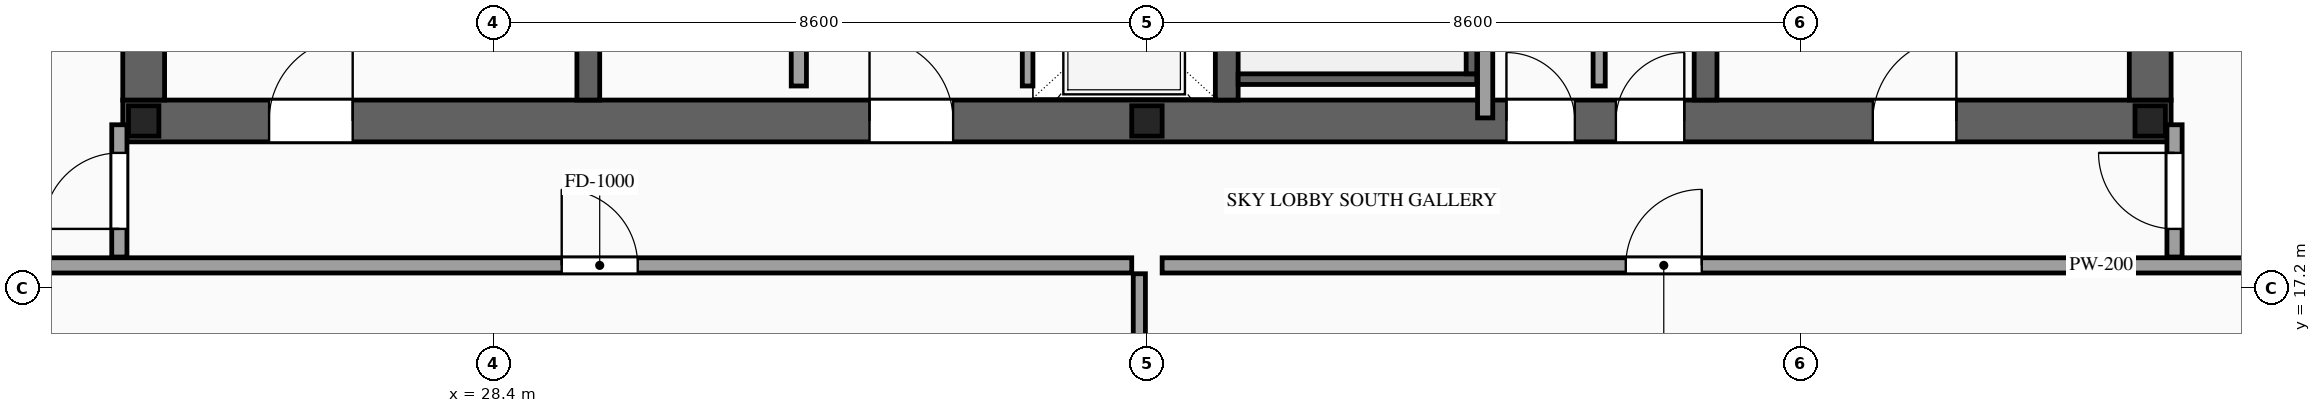
"""IFC4 building model, lengths in metres.
Left out: names, types, materials, properties, quantities, classifications, styles, units other than length and angle.
Written with IfcOpenShell. Run it as: python <this file> out.ifc"""

import sys

from ifc_helpers import new_model, si_unit, direction, frame, frame_2d, origin, origin_2d, place, context, subcontext, project, spatial, rectangle, i_section, extrude, source, transform, mapped, element, fill, save


model = new_model("IFC4")
c1 = context("Model", 3, precision=1e-05, world=origin(), true_north=direction((0.0, 1.0)))
c2 = subcontext(c1, "Body", "Model", "MODEL_VIEW")
j1 = project(units=[si_unit("LENGTHUNIT", "METRE"), si_unit("PLANEANGLEUNIT", "RADIAN")], contexts=[c1])
p1 = place(None, origin())
s1 = spatial("IfcSite", under=j1, at=p1, CompositionType="ELEMENT")
p2 = place(p1, origin())
s2 = spatial("IfcBuilding", under=s1, at=p2, CompositionType="ELEMENT")
p3 = place(p2, frame((0.0, 0.0, 259.1)))
s3 = spatial("IfcBuildingStorey", under=s2, at=p3, CompositionType="ELEMENT", Elevation=259.1)
p4 = place(p3, frame((23.525, 19.4, 0.0), z_axis=(0.0, 0.0, 1.0), x_axis=(1.0, 0.0, 0.0)))
e1 = element("IfcWall", 1, at=p4, inside=s3, PredefinedType="SHEAR", context=c2, shape_type="SweptSolid", body=[
    extrude(rectangle(XDim=26.95, YDim=0.55, at=frame_2d((13.475, 0.0))), origin(), (0.0, 0.0, 1.0), 4.4),
])
p5 = place(p4, frame((1.925, 0.0, 0.0)))
e2 = element("IfcOpeningElement", 2, at=p5, cuts=e1, PredefinedType="OPENING", context=c2, shape_type="SweptSolid", body=[
    extrude(rectangle(XDim=1.1, YDim=2.2, at=frame_2d((0.55, 1.1))), frame((0.0, 0.29, 0.0), z_axis=(0.0, -1.0, 0.0), x_axis=(1.0, 0.0, 0.0)), (0.0, 0.0, 1.0), 0.58),
])
p6 = place(p4, frame((9.825, 0.0, 0.0)))
e3 = element("IfcOpeningElement", 3, at=p6, cuts=e1, PredefinedType="OPENING", context=c2, shape_type="SweptSolid", body=[
    extrude(rectangle(XDim=1.1, YDim=2.2, at=frame_2d((0.55, 1.1))), frame((0.0, 0.29, 0.0), z_axis=(0.0, -1.0, 0.0), x_axis=(1.0, 0.0, 0.0)), (0.0, 0.0, 1.0), 0.58),
])
p7 = place(p4, frame((23.025, 0.0, 0.0)))
e4 = element("IfcOpeningElement", 4, at=p7, cuts=e1, PredefinedType="OPENING", context=c2, shape_type="SweptSolid", body=[
    extrude(rectangle(XDim=1.1, YDim=2.2, at=frame_2d((0.55, 1.1))), frame((0.0, 0.29, 0.0), z_axis=(0.0, -1.0, 0.0), x_axis=(1.0, 0.0, 0.0)), (0.0, 0.0, 1.0), 0.58),
])
p8 = place(p4, frame((19.645, 0.0, 0.0)))
e5 = element("IfcOpeningElement", 5, at=p8, cuts=e1, PredefinedType="OPENING", context=c2, shape_type="SweptSolid", body=[
    extrude(rectangle(XDim=0.9, YDim=2.15, at=frame_2d((0.45, 1.075))), frame((0.0, 0.29, 0.0), z_axis=(0.0, -1.0, 0.0), x_axis=(1.0, 0.0, 0.0)), (0.0, 0.0, 1.0), 0.58),
])
p9 = place(p4, frame((18.205, 0.0, 0.0)))
e6 = element("IfcOpeningElement", 6, at=p9, cuts=e1, PredefinedType="OPENING", context=c2, shape_type="SweptSolid", body=[
    extrude(rectangle(XDim=0.9, YDim=2.15, at=frame_2d((0.45, 1.075))), frame((0.0, 0.29, 0.0), z_axis=(0.0, -1.0, 0.0), x_axis=(1.0, 0.0, 0.0)), (0.0, 0.0, 1.0), 0.58),
])
m1 = source(origin(), c2, "Body", "SweptSolid", [
    extrude(rectangle(XDim=12.25, YDim=0.55, at=frame_2d((6.125, 0.0))), origin(), (0.0, 0.0, 1.0), 4.4),
])
for number, where, z_axis, x_axis in (
    (7, (23.8, 19.675, 0.0), (0.0, 0.0, 1.0), (0.0, 1.0, 0.0)),
    (8, (50.2, 19.675, 0.0), (0.0, 0.0, 1.0), (0.0, 1.0, 0.0)),
):
    element("IfcWall", number, at=place(p3, frame(where, z_axis=z_axis, x_axis=x_axis)), inside=s3, PredefinedType="SHEAR", context=c2, shape_type="MappedRepresentation", body=[
        mapped(m1, transform((0.0, 0.0, 0.0), scale=1.0)),
    ])
m2 = source(origin(), c2, "Body", "SweptSolid", [
    extrude(rectangle(XDim=12.25, YDim=0.3, at=frame_2d((6.125, 0.0))), origin(), (0.0, 0.0, 1.0), 4.4),
])
for number, where, z_axis, x_axis in (
    (9, (29.65, 19.675, 0.0), (0.0, 0.0, 1.0), (0.0, 1.0, 0.0)),
    (10, (38.05, 19.675, 0.0), (0.0, 0.0, 1.0), (0.0, 1.0, 0.0)),
):
    element("IfcWall", number, at=place(p3, frame(where, z_axis=z_axis, x_axis=x_axis)), inside=s3, PredefinedType="SOLIDWALL", context=c2, shape_type="MappedRepresentation", body=[
        mapped(m2, transform((0.0, 0.0, 0.0), scale=1.0)),
    ])
p10 = place(p3, frame((44.35, 19.675, 0.0), z_axis=(0.0, 0.0, 1.0), x_axis=(0.0, 1.0, 0.0)))
e11 = element("IfcWall", 11, at=p10, inside=s3, PredefinedType="SOLIDWALL", context=c2, shape_type="SweptSolid", body=[
    extrude(rectangle(XDim=12.25, YDim=0.3, at=frame_2d((6.125, 0.0))), origin(), (0.0, 0.0, 1.0), 4.4),
])
p11 = place(p10, frame((6.525, 0.0, 0.0)))
e12 = element("IfcOpeningElement", 12, at=p11, cuts=e11, PredefinedType="OPENING", context=c2, shape_type="SweptSolid", body=[
    extrude(rectangle(XDim=1.1, YDim=2.2, at=frame_2d((0.55, 1.1))), frame((0.0, 0.165, 0.0), z_axis=(0.0, -1.0, 0.0), x_axis=(1.0, 0.0, 0.0)), (0.0, 0.0, 1.0), 0.33),
])
p12 = place(p10, frame((8.625, 0.0, 0.0)))
e13 = element("IfcOpeningElement", 13, at=p12, cuts=e11, PredefinedType="OPENING", context=c2, shape_type="SweptSolid", body=[
    extrude(rectangle(XDim=1.1, YDim=2.2, at=frame_2d((0.55, 1.1))), frame((0.0, 0.165, 0.0), z_axis=(0.0, -1.0, 0.0), x_axis=(1.0, 0.0, 0.0)), (0.0, 0.0, 1.0), 0.33),
])
p13 = place(p10, frame((10.725, 0.0, 0.0)))
e14 = element("IfcOpeningElement", 14, at=p13, cuts=e11, PredefinedType="OPENING", context=c2, shape_type="SweptSolid", body=[
    extrude(rectangle(XDim=1.1, YDim=2.2, at=frame_2d((0.55, 1.1))), frame((0.0, 0.165, 0.0), z_axis=(0.0, -1.0, 0.0), x_axis=(1.0, 0.0, 0.0)), (0.0, 0.0, 1.0), 0.33),
])
m3 = source(origin(), c2, "Body", "SweptSolid", [
    extrude(i_section(OverallWidth=0.4, OverallDepth=0.4, WebThickness=0.013, FlangeThickness=0.021, at=origin_2d()), origin(), (0.0, 0.0, 1.0), 4.4),
])
for number, where, z_axis, x_axis in (
    (15, (23.8, 19.4, 0.0), (0.0, 0.0, 1.0), (1.0, 0.0, 0.0)),
    (16, (37.0, 19.4, 0.0), (0.0, 0.0, 1.0), (1.0, 0.0, 0.0)),
    (17, (50.2, 19.4, 0.0), (0.0, 0.0, 1.0), (1.0, 0.0, 0.0)),
):
    element("IfcColumn", number, at=place(p3, frame(where, z_axis=z_axis, x_axis=x_axis)), inside=s3, PredefinedType="COLUMN", context=c2, shape_type="MappedRepresentation", body=[
        mapped(m3, transform((0.0, 0.0, 0.0), scale=1.0)),
    ])
p14 = place(p3, frame((35.43, 19.86, 0.0), z_axis=(0.0, 0.0, 1.0), x_axis=(0.0, 1.0, 0.0)))
e18 = element("IfcWall", 18, at=p14, inside=s3, PredefinedType="SOLIDWALL", context=c2, shape_type="SweptSolid", body=[
    extrude(rectangle(XDim=2.04, YDim=0.14, at=frame_2d((1.02, 0.0))), origin(), (0.0, 0.0, 1.0), 4.12),
])
p15 = place(p14, frame((0.47, 0.0, 0.0)))
e19 = element("IfcOpeningElement", 19, at=p15, cuts=e18, PredefinedType="OPENING", context=c2, shape_type="SweptSolid", body=[
    extrude(rectangle(XDim=1.1, YDim=2.2, at=frame_2d((0.55, 1.1))), frame((0.0, 0.085, 0.0), z_axis=(0.0, -1.0, 0.0), x_axis=(1.0, 0.0, 0.0)), (0.0, 0.0, 1.0), 0.17),
])
m4 = source(origin(), c2, "Body", "SweptSolid", [
    extrude(rectangle(XDim=3.14, YDim=0.14, at=frame_2d((1.57, 0.0))), origin(), (0.0, 0.0, 1.0), 4.12),
])
p16 = place(p3, frame((38.2, 19.95, 0.0), z_axis=(0.0, 0.0, 1.0), x_axis=(1.0, 0.0, 0.0)))
e20 = element("IfcWall", 20, at=p16, inside=s3, PredefinedType="SOLIDWALL", context=c2, shape_type="MappedRepresentation", body=[
    mapped(m4, transform((0.0, 0.0, 0.0), scale=1.0)),
])
m5 = source(origin(), c2, "Body", "SweptSolid", [
    extrude(rectangle(XDim=8.94, YDim=0.14, at=frame_2d((4.47, 0.0))), origin(), (0.0, 0.0, 1.0), 4.12),
])
p17 = place(p3, frame((41.27, 20.02, 0.0), z_axis=(0.0, 0.0, 1.0), x_axis=(0.0, 1.0, 0.0)))
e21 = element("IfcWall", 21, at=p17, inside=s3, PredefinedType="SOLIDWALL", context=c2, shape_type="MappedRepresentation", body=[
    mapped(m5, transform((0.0, 0.0, 0.0), scale=1.0)),
])
p18 = place(p3, frame((32.42, 19.86, 0.0), z_axis=(0.0, 0.0, 1.0), x_axis=(0.0, 1.0, 0.0)))
e22 = element("IfcWall", 22, at=p18, inside=s3, PredefinedType="PARTITIONING", context=c2, shape_type="SweptSolid", body=[
    extrude(rectangle(XDim=3.94, YDim=0.2, at=frame_2d((1.97, 0.0))), origin(), (0.0, 0.0, 1.0), 4.12),
])
p19 = place(p18, frame((1.52, 0.0, 0.0)))
e23 = element("IfcOpeningElement", 23, at=p19, cuts=e22, PredefinedType="OPENING", context=c2, shape_type="SweptSolid", body=[
    extrude(rectangle(XDim=0.9, YDim=2.15, at=frame_2d((0.45, 1.075))), frame((0.0, 0.115, 0.0), z_axis=(0.0, -1.0, 0.0), x_axis=(1.0, 0.0, 0.0)), (0.0, 0.0, 1.0), 0.23),
])
m6 = source(origin(), c2, "Body", "SweptSolid", [
    extrude(rectangle(XDim=1.34, YDim=0.16, at=frame_2d((0.67, 0.0))), origin(), (0.0, 0.0, 1.0), 4.12),
])
p20 = place(p3, frame((42.95, 19.86, 0.0), z_axis=(0.0, 0.0, 1.0), x_axis=(0.0, 1.0, 0.0)))
e24 = element("IfcWall", 24, at=p20, inside=s3, PredefinedType="PARTITIONING", context=c2, shape_type="MappedRepresentation", body=[
    mapped(m6, transform((0.0, 0.0, 0.0), scale=1.0)),
])
m7 = source(origin(), c2, "Body", "SweptSolid", [
    extrude(rectangle(XDim=6.06, YDim=0.2, at=frame_2d((3.03, 0.0))), origin(), (0.0, 0.0, 1.0), 4.12),
])
p21 = place(p3, frame((41.45, 19.44, 0.0), z_axis=(0.0, 0.0, 1.0), x_axis=(0.0, 1.0, 0.0)))
e25 = element("IfcWall", 25, at=p21, inside=s3, PredefinedType="PARTITIONING", context=c2, shape_type="MappedRepresentation", body=[
    mapped(m7, transform((0.0, 0.0, 0.0), scale=1.0)),
])
p22 = place(p3, frame((19.44, 17.5, 0.0), z_axis=(0.0, 0.0, 1.0), x_axis=(1.0, 0.0, 0.0)))
e26 = element("IfcWall", 26, at=p22, inside=s3, PredefinedType="PARTITIONING", context=c2, shape_type="SweptSolid", body=[
    extrude(rectangle(XDim=17.36, YDim=0.2, at=frame_2d((8.68, 0.0))), origin(), (0.0, 0.0, 1.0), 4.12),
])
p23 = place(p22, frame((9.86, 0.0, 0.0)))
e27 = element("IfcOpeningElement", 27, at=p23, cuts=e26, PredefinedType="OPENING", context=c2, shape_type="SweptSolid", body=[
    extrude(rectangle(XDim=1.0, YDim=2.2, at=frame_2d((0.5, 1.1))), frame((0.0, 0.115, 0.0), z_axis=(0.0, -1.0, 0.0), x_axis=(1.0, 0.0, 0.0)), (0.0, 0.0, 1.0), 0.23),
])
m8 = source(origin(), c2, "Body", "SweptSolid", [
    extrude(rectangle(XDim=12.04, YDim=0.16, at=frame_2d((6.02, 0.0))), origin(), (0.0, 0.0, 1.0), 3.627),
])
p24 = place(p3, frame((36.9, 5.35, 0.0), z_axis=(0.0, 0.0, 1.0), x_axis=(0.0, 1.0, 0.0)))
e28 = element("IfcWall", 28, at=p24, inside=s3, PredefinedType="PARTITIONING", context=c2, shape_type="MappedRepresentation", body=[
    mapped(m8, transform((0.0, 0.0, 0.0), scale=1.0)),
])
p25 = place(p3, frame((37.2, 17.5, 0.0), z_axis=(0.0, 0.0, 1.0), x_axis=(1.0, 0.0, 0.0)))
e29 = element("IfcWall", 29, at=p25, inside=s3, PredefinedType="PARTITIONING", context=c2, shape_type="SweptSolid", body=[
    extrude(rectangle(XDim=17.36, YDim=0.2, at=frame_2d((8.68, 0.0))), origin(), (0.0, 0.0, 1.0), 4.12),
])
p26 = place(p25, frame((6.1, 0.0, 0.0)))
e30 = element("IfcOpeningElement", 30, at=p26, cuts=e29, PredefinedType="OPENING", context=c2, shape_type="SweptSolid", body=[
    extrude(rectangle(XDim=1.0, YDim=2.2, at=frame_2d((0.5, 1.1))), frame((0.0, 0.115, 0.0), z_axis=(0.0, -1.0, 0.0), x_axis=(1.0, 0.0, 0.0)), (0.0, 0.0, 1.0), 0.23),
])
p27 = place(p3, frame((23.48, 17.61, 0.0), z_axis=(0.0, 0.0, 1.0), x_axis=(0.0, 1.0, 0.0)))
e31 = element("IfcWall", 31, at=p27, inside=s3, PredefinedType="PARTITIONING", context=c2, shape_type="SweptSolid", body=[
    extrude(rectangle(XDim=1.74, YDim=0.2, at=frame_2d((0.87, 0.0))), origin(), (0.0, 0.0, 1.0), 4.12),
])
p28 = place(p27, frame((0.37, 0.0, 0.0)))
e32 = element("IfcOpeningElement", 32, at=p28, cuts=e31, PredefinedType="OPENING", context=c2, shape_type="SweptSolid", body=[
    extrude(rectangle(XDim=1.0, YDim=2.2, at=frame_2d((0.5, 1.1))), frame((0.0, 0.115, 0.0), z_axis=(0.0, -1.0, 0.0), x_axis=(1.0, 0.0, 0.0)), (0.0, 0.0, 1.0), 0.23),
])
p29 = place(p3, frame((50.52, 17.61, 0.0), z_axis=(0.0, 0.0, 1.0), x_axis=(0.0, 1.0, 0.0)))
e33 = element("IfcWall", 33, at=p29, inside=s3, PredefinedType="PARTITIONING", context=c2, shape_type="SweptSolid", body=[
    extrude(rectangle(XDim=1.74, YDim=0.2, at=frame_2d((0.87, 0.0))), origin(), (0.0, 0.0, 1.0), 4.12),
])
p30 = place(p29, frame((0.37, 0.0, 0.0)))
e34 = element("IfcOpeningElement", 34, at=p30, cuts=e33, PredefinedType="OPENING", context=c2, shape_type="SweptSolid", body=[
    extrude(rectangle(XDim=1.0, YDim=2.2, at=frame_2d((0.5, 1.1))), frame((0.0, 0.115, 0.0), z_axis=(0.0, -1.0, 0.0), x_axis=(1.0, 0.0, 0.0)), (0.0, 0.0, 1.0), 0.23),
])
m9 = source(origin(), c2, "Body", "SweptSolid", [
    extrude(rectangle(XDim=1.1, YDim=2.2, at=frame_2d((0.55, 1.1))), frame((0.0, 0.025, 0.0), z_axis=(0.0, -1.0, 0.0), x_axis=(1.0, 0.0, 0.0)), (0.0, 0.0, 1.0), 0.05),
])
p31 = place(p5, origin())
e35 = element("IfcDoor", 35, at=p31, inside=s3, OperationType="SINGLE_SWING_RIGHT", PredefinedType="DOOR", context=c2, shape_type="MappedRepresentation", body=[
    mapped(m9, transform((0.0, 0.0, 0.0), scale=1.0)),
])
fill(e2, e35)
p32 = place(p6, origin())
e36 = element("IfcDoor", 36, at=p32, inside=s3, OperationType="SINGLE_SWING_LEFT", PredefinedType="DOOR", context=c2, shape_type="MappedRepresentation", body=[
    mapped(m9, transform((0.0, 0.0, 0.0), scale=1.0)),
])
fill(e3, e36)
p33 = place(p7, origin())
e37 = element("IfcDoor", 37, at=p33, inside=s3, OperationType="SINGLE_SWING_RIGHT", PredefinedType="DOOR", context=c2, shape_type="MappedRepresentation", body=[
    mapped(m9, transform((0.0, 0.0, 0.0), scale=1.0)),
])
fill(e4, e37)
m10 = source(origin(), c2, "Body", "SweptSolid", [
    extrude(rectangle(XDim=0.9, YDim=2.15, at=frame_2d((0.45, 1.075))), frame((0.0, 0.025, 0.0), z_axis=(0.0, -1.0, 0.0), x_axis=(1.0, 0.0, 0.0)), (0.0, 0.0, 1.0), 0.05),
])
p34 = place(p8, origin())
e38 = element("IfcDoor", 38, at=p34, inside=s3, OperationType="SINGLE_SWING_RIGHT", PredefinedType="DOOR", context=c2, shape_type="MappedRepresentation", body=[
    mapped(m10, transform((0.0, 0.0, 0.0), scale=1.0)),
])
fill(e5, e38)
p35 = place(p9, origin())
e39 = element("IfcDoor", 39, at=p35, inside=s3, OperationType="SINGLE_SWING_LEFT", PredefinedType="DOOR", context=c2, shape_type="MappedRepresentation", body=[
    mapped(m10, transform((0.0, 0.0, 0.0), scale=1.0)),
])
fill(e6, e39)
m11 = source(origin(), c2, "Body", "SweptSolid", [
    extrude(rectangle(XDim=1.0, YDim=2.2, at=frame_2d((0.5, 1.1))), frame((0.0, 0.025, 0.0), z_axis=(0.0, -1.0, 0.0), x_axis=(1.0, 0.0, 0.0)), (0.0, 0.0, 1.0), 0.05),
])
p36 = place(p23, origin())
e40 = element("IfcDoor", 40, at=p36, inside=s3, OperationType="SINGLE_SWING_LEFT", PredefinedType="DOOR", context=c2, shape_type="MappedRepresentation", body=[
    mapped(m11, transform((0.0, 0.0, 0.0), scale=1.0)),
])
fill(e27, e40)
p37 = place(p26, origin())
e41 = element("IfcDoor", 41, at=p37, inside=s3, OperationType="SINGLE_SWING_RIGHT", PredefinedType="DOOR", context=c2, shape_type="MappedRepresentation", body=[
    mapped(m11, transform((0.0, 0.0, 0.0), scale=1.0)),
])
fill(e30, e41)
p38 = place(p28, origin())
e42 = element("IfcDoor", 42, at=p38, inside=s3, OperationType="SINGLE_SWING_LEFT", PredefinedType="DOOR", context=c2, shape_type="MappedRepresentation", body=[
    mapped(m11, transform((0.0, 0.0, 0.0), scale=1.0)),
])
fill(e32, e42)
p39 = place(p30, origin())
e43 = element("IfcDoor", 43, at=p39, inside=s3, OperationType="SINGLE_SWING_RIGHT", PredefinedType="DOOR", context=c2, shape_type="MappedRepresentation", body=[
    mapped(m11, transform((0.0, 0.0, 0.0), scale=1.0)),
])
fill(e34, e43)
save(model, sys.argv[1])
